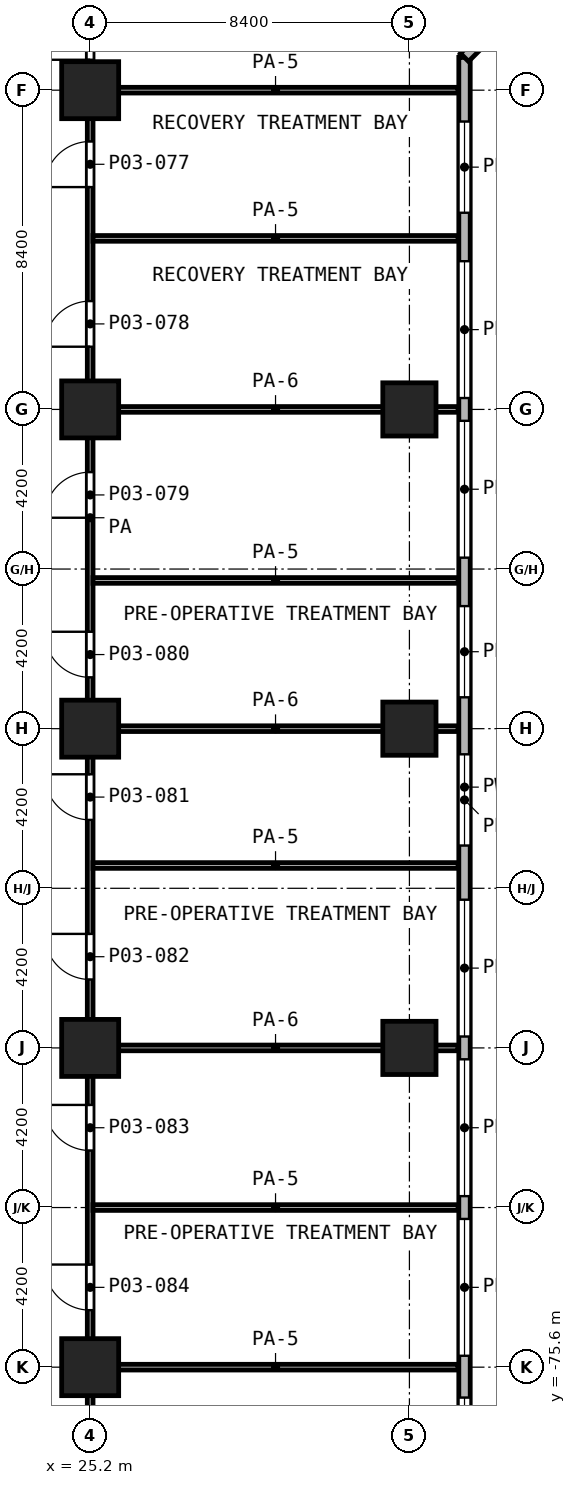
"""IFC4 building model, lengths in metres.
Left out: names, types, materials, properties, quantities, classifications, styles, units other than length and angle.
Written with IfcOpenShell. Run it as: python <this file> out.ifc"""

import sys

from ifc_helpers import new_model, si_unit, direction, frame, frame_2d, origin, origin_2d, place, context, subcontext, project, spatial, rectangle, extrude, element, fill, save


model = new_model("IFC4")
c1 = context("Model", 3, precision=1e-05, world=origin(), true_north=direction((0.0, 1.0)))
c2 = subcontext(c1, "Body", "Model", "MODEL_VIEW")
j1 = project(units=[si_unit("LENGTHUNIT", "METRE"), si_unit("PLANEANGLEUNIT", "RADIAN")], contexts=[c1])
p1 = place(None, origin())
s1 = spatial("IfcSite", under=j1, at=p1, CompositionType="ELEMENT")
p2 = place(p1, origin())
s2 = spatial("IfcBuilding", under=s1, at=p2, CompositionType="ELEMENT")
p3 = place(p2, frame((0.0, 0.0, 12.6)))
s3 = spatial("IfcBuildingStorey", under=s2, at=p3, CompositionType="ELEMENT", Elevation=12.6)
for number, where, z_axis, x_axis in (
    (1, (25.2, -42.0, 0.0), (0.0, 0.0, 1.0), (1.0, 0.0, 0.0)),
    (2, (25.2, -50.4, 0.0), (0.0, 0.0, 1.0), (1.0, 0.0, 0.0)),
):
    element("IfcColumn", number, at=place(p3, frame(where, z_axis=z_axis, x_axis=x_axis)), inside=s3, PredefinedType="COLUMN", context=c2, shape_type="SweptSolid", body=[
        extrude(rectangle(XDim=1.5, YDim=1.5, at=origin_2d()), origin(), (0.0, 0.0, 1.0), 5.6),
    ])
p4 = place(p3, frame((33.6, -50.4, 0.0), z_axis=(0.0, 0.0, 1.0), x_axis=(1.0, 0.0, 0.0)))
e3 = element("IfcColumn", 3, at=p4, inside=s3, PredefinedType="COLUMN", context=c2, shape_type="SweptSolid", body=[
    extrude(rectangle(XDim=1.4, YDim=1.4, at=origin_2d()), origin(), (0.0, 0.0, 1.0), 5.6),
])
p5 = place(p3, frame((25.2, -58.8, 0.0), z_axis=(0.0, 0.0, 1.0), x_axis=(1.0, 0.0, 0.0)))
e4 = element("IfcColumn", 4, at=p5, inside=s3, PredefinedType="COLUMN", context=c2, shape_type="SweptSolid", body=[
    extrude(rectangle(XDim=1.5, YDim=1.5, at=origin_2d()), origin(), (0.0, 0.0, 1.0), 5.6),
])
p6 = place(p3, frame((33.6, -58.8, 0.0), z_axis=(0.0, 0.0, 1.0), x_axis=(1.0, 0.0, 0.0)))
e5 = element("IfcColumn", 5, at=p6, inside=s3, PredefinedType="COLUMN", context=c2, shape_type="SweptSolid", body=[
    extrude(rectangle(XDim=1.4, YDim=1.4, at=origin_2d()), origin(), (0.0, 0.0, 1.0), 5.6),
])
p7 = place(p3, frame((25.2, -67.2, 0.0), z_axis=(0.0, 0.0, 1.0), x_axis=(1.0, 0.0, 0.0)))
e6 = element("IfcColumn", 6, at=p7, inside=s3, PredefinedType="COLUMN", context=c2, shape_type="SweptSolid", body=[
    extrude(rectangle(XDim=1.5, YDim=1.5, at=origin_2d()), origin(), (0.0, 0.0, 1.0), 5.6),
])
p8 = place(p3, frame((33.6, -67.2, 0.0), z_axis=(0.0, 0.0, 1.0), x_axis=(1.0, 0.0, 0.0)))
e7 = element("IfcColumn", 7, at=p8, inside=s3, PredefinedType="COLUMN", context=c2, shape_type="SweptSolid", body=[
    extrude(rectangle(XDim=1.4, YDim=1.4, at=origin_2d()), origin(), (0.0, 0.0, 1.0), 5.6),
])
p9 = place(p3, frame((25.2, -75.6, 0.0), z_axis=(0.0, 0.0, 1.0), x_axis=(1.0, 0.0, 0.0)))
e8 = element("IfcColumn", 8, at=p9, inside=s3, PredefinedType="COLUMN", context=c2, shape_type="SweptSolid", body=[
    extrude(rectangle(XDim=1.5, YDim=1.5, at=origin_2d()), origin(), (0.0, 0.0, 1.0), 5.6),
])
p10 = place(p3, frame((35.05, -79.538, 0.0), z_axis=(0.0, 0.0, 1.0), x_axis=(0.0, 1.0, 0.0)))
e9 = element("IfcWall", 9, at=p10, inside=s3, PredefinedType="SOLIDWALL", context=c2, shape_type="SweptSolid", body=[
    extrude(rectangle(XDim=38.4, YDim=0.3, at=frame_2d((19.2, 0.0))), origin(), (0.0, 0.0, 1.0), 5.25),
])
p11 = place(p10, frame((0.738, 0.0, 0.9)))
e10 = element("IfcOpeningElement", 10, at=p11, cuts=e9, PredefinedType="OPENING", context=c2, shape_type="SweptSolid", body=[
    extrude(rectangle(XDim=2.4, YDim=3.0, at=frame_2d((1.2, 1.5))), frame((0.0, 0.16, 0.0), z_axis=(0.0, -1.0, 0.0), x_axis=(1.0, 0.0, 0.0)), (0.0, 0.0, 1.0), 0.32),
])
p12 = place(p10, frame((4.238, 0.0, 0.9)))
e11 = element("IfcOpeningElement", 11, at=p12, cuts=e9, PredefinedType="OPENING", context=c2, shape_type="SweptSolid", body=[
    extrude(rectangle(XDim=3.6, YDim=3.0, at=frame_2d((1.8, 1.5))), frame((0.0, 0.16, 0.0), z_axis=(0.0, -1.0, 0.0), x_axis=(1.0, 0.0, 0.0)), (0.0, 0.0, 1.0), 0.32),
])
p13 = place(p10, frame((8.438, 0.0, 0.9)))
e12 = element("IfcOpeningElement", 12, at=p13, cuts=e9, PredefinedType="OPENING", context=c2, shape_type="SweptSolid", body=[
    extrude(rectangle(XDim=3.6, YDim=3.0, at=frame_2d((1.8, 1.5))), frame((0.0, 0.16, 0.0), z_axis=(0.0, -1.0, 0.0), x_axis=(1.0, 0.0, 0.0)), (0.0, 0.0, 1.0), 0.32),
])
p14 = place(p10, frame((12.638, 0.0, 0.9)))
e13 = element("IfcOpeningElement", 13, at=p14, cuts=e9, PredefinedType="OPENING", context=c2, shape_type="SweptSolid", body=[
    extrude(rectangle(XDim=3.6, YDim=3.0, at=frame_2d((1.8, 1.5))), frame((0.0, 0.16, 0.0), z_axis=(0.0, -1.0, 0.0), x_axis=(1.0, 0.0, 0.0)), (0.0, 0.0, 1.0), 0.32),
])
p15 = place(p10, frame((17.663, 0.0, 0.9)))
e14 = element("IfcOpeningElement", 14, at=p15, cuts=e9, PredefinedType="OPENING", context=c2, shape_type="SweptSolid", body=[
    extrude(rectangle(XDim=2.4, YDim=3.0, at=frame_2d((1.2, 1.5))), frame((0.0, 0.16, 0.0), z_axis=(0.0, -1.0, 0.0), x_axis=(1.0, 0.0, 0.0)), (0.0, 0.0, 1.0), 0.32),
])
p16 = place(p10, frame((21.563, 0.0, 0.9)))
e15 = element("IfcOpeningElement", 15, at=p16, cuts=e9, PredefinedType="OPENING", context=c2, shape_type="SweptSolid", body=[
    extrude(rectangle(XDim=2.4, YDim=3.0, at=frame_2d((1.2, 1.5))), frame((0.0, 0.16, 0.0), z_axis=(0.0, -1.0, 0.0), x_axis=(1.0, 0.0, 0.0)), (0.0, 0.0, 1.0), 0.32),
])
p17 = place(p10, frame((25.238, 0.0, 0.9)))
e16 = element("IfcOpeningElement", 16, at=p17, cuts=e9, PredefinedType="OPENING", context=c2, shape_type="SweptSolid", body=[
    extrude(rectangle(XDim=3.6, YDim=3.0, at=frame_2d((1.8, 1.5))), frame((0.0, 0.16, 0.0), z_axis=(0.0, -1.0, 0.0), x_axis=(1.0, 0.0, 0.0)), (0.0, 0.0, 1.0), 0.32),
])
p18 = place(p10, frame((29.438, 0.0, 0.9)))
e17 = element("IfcOpeningElement", 17, at=p18, cuts=e9, PredefinedType="OPENING", context=c2, shape_type="SweptSolid", body=[
    extrude(rectangle(XDim=3.6, YDim=3.0, at=frame_2d((1.8, 1.5))), frame((0.0, 0.16, 0.0), z_axis=(0.0, -1.0, 0.0), x_axis=(1.0, 0.0, 0.0)), (0.0, 0.0, 1.0), 0.32),
])
p19 = place(p10, frame((34.313, 0.0, 0.9)))
e18 = element("IfcOpeningElement", 18, at=p19, cuts=e9, PredefinedType="OPENING", context=c2, shape_type="SweptSolid", body=[
    extrude(rectangle(XDim=2.4, YDim=3.0, at=frame_2d((1.2, 1.5))), frame((0.0, 0.16, 0.0), z_axis=(0.0, -1.0, 0.0), x_axis=(1.0, 0.0, 0.0)), (0.0, 0.0, 1.0), 0.32),
])
p20 = place(p3, frame((35.05, -41.138, 0.0), z_axis=(0.0, 0.0, 1.0), x_axis=(0.707106781187, 0.707106781187, 0.0)))
e19 = element("IfcWall", 19, at=p20, inside=s3, PredefinedType="SOLIDWALL", context=c2, shape_type="SweptSolid", body=[
    extrude(rectangle(XDim=8.61, YDim=0.3, at=frame_2d((4.305, 0.0))), origin(), (0.0, 0.0, 1.0), 5.25),
])
p21 = place(p20, frame((2.34, 0.0, 0.9)))
e20 = element("IfcOpeningElement", 20, at=p21, cuts=e19, PredefinedType="OPENING", context=c2, shape_type="SweptSolid", body=[
    extrude(rectangle(XDim=1.2, YDim=3.0, at=frame_2d((0.6, 1.5))), frame((0.0, 0.16, 0.0), z_axis=(0.0, -1.0, 0.0), x_axis=(1.0, 0.0, 0.0)), (0.0, 0.0, 1.0), 0.32),
])
p22 = place(p20, frame((5.593, 0.0, 0.9)))
e21 = element("IfcOpeningElement", 21, at=p22, cuts=e19, PredefinedType="OPENING", context=c2, shape_type="SweptSolid", body=[
    extrude(rectangle(XDim=2.4, YDim=3.0, at=frame_2d((1.2, 1.5))), frame((0.0, 0.16, 0.0), z_axis=(0.0, -1.0, 0.0), x_axis=(1.0, 0.0, 0.0)), (0.0, 0.0, 1.0), 0.32),
])
for number, where, z_axis, x_axis in (
    (22, (25.275, -75.6, 0.0), (0.0, 0.0, 1.0), (1.0, 0.0, 0.0)),
    (23, (25.275, -71.4, 0.0), (0.0, 0.0, 1.0), (1.0, 0.0, 0.0)),
):
    element("IfcWall", number, at=place(p3, frame(where, z_axis=z_axis, x_axis=x_axis)), inside=s3, PredefinedType="PARTITIONING", context=c2, shape_type="SweptSolid", body=[
        extrude(rectangle(XDim=9.605, YDim=0.15, at=frame_2d((4.802, 0.0))), origin(), (0.0, 0.0, 1.0), 3.85),
    ])
p23 = place(p3, frame((25.275, -67.2, 0.0), z_axis=(0.0, 0.0, 1.0), x_axis=(1.0, 0.0, 0.0)))
e24 = element("IfcWall", 24, at=p23, inside=s3, PredefinedType="PARTITIONING", context=c2, shape_type="SweptSolid", body=[
    extrude(rectangle(XDim=9.605, YDim=0.15, at=frame_2d((4.802, 0.0))), origin(), (0.0, 0.0, 1.0), 4.35),
])
p24 = place(p3, frame((25.275, -62.4, 0.0), z_axis=(0.0, 0.0, 1.0), x_axis=(1.0, 0.0, 0.0)))
e25 = element("IfcWall", 25, at=p24, inside=s3, PredefinedType="PARTITIONING", context=c2, shape_type="SweptSolid", body=[
    extrude(rectangle(XDim=9.605, YDim=0.15, at=frame_2d((4.802, 0.0))), origin(), (0.0, 0.0, 1.0), 3.85),
])
p25 = place(p3, frame((25.275, -58.8, 0.0), z_axis=(0.0, 0.0, 1.0), x_axis=(1.0, 0.0, 0.0)))
e26 = element("IfcWall", 26, at=p25, inside=s3, PredefinedType="PARTITIONING", context=c2, shape_type="SweptSolid", body=[
    extrude(rectangle(XDim=9.605, YDim=0.15, at=frame_2d((4.802, 0.0))), origin(), (0.0, 0.0, 1.0), 4.35),
])
p26 = place(p3, frame((25.275, -54.9, 0.0), z_axis=(0.0, 0.0, 1.0), x_axis=(1.0, 0.0, 0.0)))
e27 = element("IfcWall", 27, at=p26, inside=s3, PredefinedType="PARTITIONING", context=c2, shape_type="SweptSolid", body=[
    extrude(rectangle(XDim=9.605, YDim=0.15, at=frame_2d((4.802, 0.0))), origin(), (0.0, 0.0, 1.0), 3.85),
])
p27 = place(p3, frame((25.275, -50.4, 0.0), z_axis=(0.0, 0.0, 1.0), x_axis=(1.0, 0.0, 0.0)))
e28 = element("IfcWall", 28, at=p27, inside=s3, PredefinedType="PARTITIONING", context=c2, shape_type="SweptSolid", body=[
    extrude(rectangle(XDim=9.605, YDim=0.15, at=frame_2d((4.802, 0.0))), origin(), (0.0, 0.0, 1.0), 4.35),
])
for number, where, z_axis, x_axis in (
    (29, (25.275, -45.9, 0.0), (0.0, 0.0, 1.0), (1.0, 0.0, 0.0)),
    (30, (25.275, -42.0, 0.0), (0.0, 0.0, 1.0), (1.0, 0.0, 0.0)),
):
    element("IfcWall", number, at=place(p3, frame(where, z_axis=z_axis, x_axis=x_axis)), inside=s3, PredefinedType="PARTITIONING", context=c2, shape_type="SweptSolid", body=[
        extrude(rectangle(XDim=9.605, YDim=0.15, at=frame_2d((4.802, 0.0))), origin(), (0.0, 0.0, 1.0), 3.85),
    ])
p28 = place(p3, frame((25.2, -81.3, 0.0), z_axis=(0.0, 0.0, 1.0), x_axis=(0.0, 1.0, 0.0)))
e31 = element("IfcWall", 31, at=p28, inside=s3, PredefinedType="PARTITIONING", context=c2, shape_type="SweptSolid", body=[
    extrude(rectangle(XDim=56.1, YDim=0.15, at=frame_2d((28.05, 0.0))), origin(), (0.0, 0.0, 1.0), 5.25),
])
p29 = place(p28, frame((48.5, 0.0, 0.0)))
e32 = element("IfcOpeningElement", 32, at=p29, cuts=e31, PredefinedType="OPENING", context=c2, shape_type="SweptSolid", body=[
    extrude(rectangle(XDim=1.2, YDim=2.1, at=frame_2d((0.6, 1.05))), frame((0.0, 0.085, 0.0), z_axis=(0.0, -1.0, 0.0), x_axis=(1.0, 0.0, 0.0)), (0.0, 0.0, 1.0), 0.17),
])
p30 = place(p28, frame((40.1, 0.0, 0.0)))
e33 = element("IfcOpeningElement", 33, at=p30, cuts=e31, PredefinedType="OPENING", context=c2, shape_type="SweptSolid", body=[
    extrude(rectangle(XDim=1.2, YDim=2.1, at=frame_2d((0.6, 1.05))), frame((0.0, 0.085, 0.0), z_axis=(0.0, -1.0, 0.0), x_axis=(1.0, 0.0, 0.0)), (0.0, 0.0, 1.0), 0.17),
])
p31 = place(p28, frame((36.75, 0.0, 0.0)))
e34 = element("IfcOpeningElement", 34, at=p31, cuts=e31, PredefinedType="OPENING", context=c2, shape_type="SweptSolid", body=[
    extrude(rectangle(XDim=1.2, YDim=2.1, at=frame_2d((0.6, 1.05))), frame((0.0, 0.085, 0.0), z_axis=(0.0, -1.0, 0.0), x_axis=(1.0, 0.0, 0.0)), (0.0, 0.0, 1.0), 0.17),
])
p32 = place(p28, frame((32.55, 0.0, 0.0)))
e35 = element("IfcOpeningElement", 35, at=p32, cuts=e31, PredefinedType="OPENING", context=c2, shape_type="SweptSolid", body=[
    extrude(rectangle(XDim=1.2, YDim=2.1, at=frame_2d((0.6, 1.05))), frame((0.0, 0.085, 0.0), z_axis=(0.0, -1.0, 0.0), x_axis=(1.0, 0.0, 0.0)), (0.0, 0.0, 1.0), 0.17),
])
p33 = place(p28, frame((28.05, 0.0, 0.0)))
e36 = element("IfcOpeningElement", 36, at=p33, cuts=e31, PredefinedType="OPENING", context=c2, shape_type="SweptSolid", body=[
    extrude(rectangle(XDim=1.2, YDim=2.1, at=frame_2d((0.6, 1.05))), frame((0.0, 0.085, 0.0), z_axis=(0.0, -1.0, 0.0), x_axis=(1.0, 0.0, 0.0)), (0.0, 0.0, 1.0), 0.17),
])
p34 = place(p28, frame((23.85, 0.0, 0.0)))
e37 = element("IfcOpeningElement", 37, at=p34, cuts=e31, PredefinedType="OPENING", context=c2, shape_type="SweptSolid", body=[
    extrude(rectangle(XDim=1.2, YDim=2.1, at=frame_2d((0.6, 1.05))), frame((0.0, 0.085, 0.0), z_axis=(0.0, -1.0, 0.0), x_axis=(1.0, 0.0, 0.0)), (0.0, 0.0, 1.0), 0.17),
])
p35 = place(p28, frame((20.1, 0.0, 0.0)))
e38 = element("IfcOpeningElement", 38, at=p35, cuts=e31, PredefinedType="OPENING", context=c2, shape_type="SweptSolid", body=[
    extrude(rectangle(XDim=1.2, YDim=2.1, at=frame_2d((0.6, 1.05))), frame((0.0, 0.085, 0.0), z_axis=(0.0, -1.0, 0.0), x_axis=(1.0, 0.0, 0.0)), (0.0, 0.0, 1.0), 0.17),
])
p36 = place(p28, frame((15.9, 0.0, 0.0)))
e39 = element("IfcOpeningElement", 39, at=p36, cuts=e31, PredefinedType="OPENING", context=c2, shape_type="SweptSolid", body=[
    extrude(rectangle(XDim=1.2, YDim=2.1, at=frame_2d((0.6, 1.05))), frame((0.0, 0.085, 0.0), z_axis=(0.0, -1.0, 0.0), x_axis=(1.0, 0.0, 0.0)), (0.0, 0.0, 1.0), 0.17),
])
p37 = place(p28, frame((11.4, 0.0, 0.0)))
e40 = element("IfcOpeningElement", 40, at=p37, cuts=e31, PredefinedType="OPENING", context=c2, shape_type="SweptSolid", body=[
    extrude(rectangle(XDim=1.2, YDim=2.1, at=frame_2d((0.6, 1.05))), frame((0.0, 0.085, 0.0), z_axis=(0.0, -1.0, 0.0), x_axis=(1.0, 0.0, 0.0)), (0.0, 0.0, 1.0), 0.17),
])
p38 = place(p28, frame((7.2, 0.0, 0.0)))
e41 = element("IfcOpeningElement", 41, at=p38, cuts=e31, PredefinedType="OPENING", context=c2, shape_type="SweptSolid", body=[
    extrude(rectangle(XDim=1.2, YDim=2.1, at=frame_2d((0.6, 1.05))), frame((0.0, 0.085, 0.0), z_axis=(0.0, -1.0, 0.0), x_axis=(1.0, 0.0, 0.0)), (0.0, 0.0, 1.0), 0.17),
])
p39 = place(p28, frame((2.7, 0.0, 0.0)))
e42 = element("IfcOpeningElement", 42, at=p39, cuts=e31, PredefinedType="OPENING", context=c2, shape_type="SweptSolid", body=[
    extrude(rectangle(XDim=1.2, YDim=2.1, at=frame_2d((0.6, 1.05))), frame((0.0, 0.085, 0.0), z_axis=(0.0, -1.0, 0.0), x_axis=(1.0, 0.0, 0.0)), (0.0, 0.0, 1.0), 0.17),
])
p40 = place(p11, origin())
e43 = element("IfcWindow", 43, at=p40, inside=s3, PartitioningType="SINGLE_PANEL", PredefinedType="WINDOW", context=c2, shape_type="SweptSolid", body=[
    extrude(rectangle(XDim=2.4, YDim=3.0, at=frame_2d((1.2, 1.5))), frame((0.0, 0.03, 0.0), z_axis=(0.0, -1.0, 0.0), x_axis=(1.0, 0.0, 0.0)), (0.0, 0.0, 1.0), 0.06),
])
fill(e10, e43)
p41 = place(p12, origin())
e44 = element("IfcWindow", 44, at=p41, inside=s3, PartitioningType="SINGLE_PANEL", PredefinedType="WINDOW", context=c2, shape_type="SweptSolid", body=[
    extrude(rectangle(XDim=3.6, YDim=3.0, at=frame_2d((1.8, 1.5))), frame((0.0, 0.03, 0.0), z_axis=(0.0, -1.0, 0.0), x_axis=(1.0, 0.0, 0.0)), (0.0, 0.0, 1.0), 0.06),
])
fill(e11, e44)
p42 = place(p13, origin())
e45 = element("IfcWindow", 45, at=p42, inside=s3, PartitioningType="SINGLE_PANEL", PredefinedType="WINDOW", context=c2, shape_type="SweptSolid", body=[
    extrude(rectangle(XDim=3.6, YDim=3.0, at=frame_2d((1.8, 1.5))), frame((0.0, 0.03, 0.0), z_axis=(0.0, -1.0, 0.0), x_axis=(1.0, 0.0, 0.0)), (0.0, 0.0, 1.0), 0.06),
])
fill(e12, e45)
p43 = place(p14, origin())
e46 = element("IfcWindow", 46, at=p43, inside=s3, PartitioningType="SINGLE_PANEL", PredefinedType="WINDOW", context=c2, shape_type="SweptSolid", body=[
    extrude(rectangle(XDim=3.6, YDim=3.0, at=frame_2d((1.8, 1.5))), frame((0.0, 0.03, 0.0), z_axis=(0.0, -1.0, 0.0), x_axis=(1.0, 0.0, 0.0)), (0.0, 0.0, 1.0), 0.06),
])
fill(e13, e46)
p44 = place(p15, origin())
e47 = element("IfcWindow", 47, at=p44, inside=s3, PartitioningType="SINGLE_PANEL", PredefinedType="WINDOW", context=c2, shape_type="SweptSolid", body=[
    extrude(rectangle(XDim=2.4, YDim=3.0, at=frame_2d((1.2, 1.5))), frame((0.0, 0.03, 0.0), z_axis=(0.0, -1.0, 0.0), x_axis=(1.0, 0.0, 0.0)), (0.0, 0.0, 1.0), 0.06),
])
fill(e14, e47)
p45 = place(p16, origin())
e48 = element("IfcWindow", 48, at=p45, inside=s3, PartitioningType="SINGLE_PANEL", PredefinedType="WINDOW", context=c2, shape_type="SweptSolid", body=[
    extrude(rectangle(XDim=2.4, YDim=3.0, at=frame_2d((1.2, 1.5))), frame((0.0, 0.03, 0.0), z_axis=(0.0, -1.0, 0.0), x_axis=(1.0, 0.0, 0.0)), (0.0, 0.0, 1.0), 0.06),
])
fill(e15, e48)
p46 = place(p17, origin())
e49 = element("IfcWindow", 49, at=p46, inside=s3, PartitioningType="SINGLE_PANEL", PredefinedType="WINDOW", context=c2, shape_type="SweptSolid", body=[
    extrude(rectangle(XDim=3.6, YDim=3.0, at=frame_2d((1.8, 1.5))), frame((0.0, 0.03, 0.0), z_axis=(0.0, -1.0, 0.0), x_axis=(1.0, 0.0, 0.0)), (0.0, 0.0, 1.0), 0.06),
])
fill(e16, e49)
p47 = place(p18, origin())
e50 = element("IfcWindow", 50, at=p47, inside=s3, PartitioningType="SINGLE_PANEL", PredefinedType="WINDOW", context=c2, shape_type="SweptSolid", body=[
    extrude(rectangle(XDim=3.6, YDim=3.0, at=frame_2d((1.8, 1.5))), frame((0.0, 0.03, 0.0), z_axis=(0.0, -1.0, 0.0), x_axis=(1.0, 0.0, 0.0)), (0.0, 0.0, 1.0), 0.06),
])
fill(e17, e50)
p48 = place(p19, origin())
e51 = element("IfcWindow", 51, at=p48, inside=s3, PartitioningType="SINGLE_PANEL", PredefinedType="WINDOW", context=c2, shape_type="SweptSolid", body=[
    extrude(rectangle(XDim=2.4, YDim=3.0, at=frame_2d((1.2, 1.5))), frame((0.0, 0.03, 0.0), z_axis=(0.0, -1.0, 0.0), x_axis=(1.0, 0.0, 0.0)), (0.0, 0.0, 1.0), 0.06),
])
fill(e18, e51)
p49 = place(p30, origin())
e52 = element("IfcDoor", 52, at=p49, inside=s3, OperationType="SINGLE_SWING_LEFT", PredefinedType="DOOR", context=c2, shape_type="SweptSolid", body=[
    extrude(rectangle(XDim=1.2, YDim=2.1, at=frame_2d((0.6, 1.05))), frame((0.0, 0.025, 0.0), z_axis=(0.0, -1.0, 0.0), x_axis=(1.0, 0.0, 0.0)), (0.0, 0.0, 1.0), 0.05),
])
fill(e33, e52)
p50 = place(p31, origin())
e53 = element("IfcDoor", 53, at=p50, inside=s3, OperationType="SINGLE_SWING_LEFT", PredefinedType="DOOR", context=c2, shape_type="SweptSolid", body=[
    extrude(rectangle(XDim=1.2, YDim=2.1, at=frame_2d((0.6, 1.05))), frame((0.0, 0.025, 0.0), z_axis=(0.0, -1.0, 0.0), x_axis=(1.0, 0.0, 0.0)), (0.0, 0.0, 1.0), 0.05),
])
fill(e34, e53)
p51 = place(p32, origin())
e54 = element("IfcDoor", 54, at=p51, inside=s3, OperationType="SINGLE_SWING_LEFT", PredefinedType="DOOR", context=c2, shape_type="SweptSolid", body=[
    extrude(rectangle(XDim=1.2, YDim=2.1, at=frame_2d((0.6, 1.05))), frame((0.0, 0.025, 0.0), z_axis=(0.0, -1.0, 0.0), x_axis=(1.0, 0.0, 0.0)), (0.0, 0.0, 1.0), 0.05),
])
fill(e35, e54)
p52 = place(p33, origin())
e55 = element("IfcDoor", 55, at=p52, inside=s3, OperationType="SINGLE_SWING_LEFT", PredefinedType="DOOR", context=c2, shape_type="SweptSolid", body=[
    extrude(rectangle(XDim=1.2, YDim=2.1, at=frame_2d((0.6, 1.05))), frame((0.0, 0.025, 0.0), z_axis=(0.0, -1.0, 0.0), x_axis=(1.0, 0.0, 0.0)), (0.0, 0.0, 1.0), 0.05),
])
fill(e36, e55)
p53 = place(p34, origin())
e56 = element("IfcDoor", 56, at=p53, inside=s3, OperationType="SINGLE_SWING_RIGHT", PredefinedType="DOOR", context=c2, shape_type="SweptSolid", body=[
    extrude(rectangle(XDim=1.2, YDim=2.1, at=frame_2d((0.6, 1.05))), frame((0.0, 0.025, 0.0), z_axis=(0.0, -1.0, 0.0), x_axis=(1.0, 0.0, 0.0)), (0.0, 0.0, 1.0), 0.05),
])
fill(e37, e56)
p54 = place(p35, origin())
e57 = element("IfcDoor", 57, at=p54, inside=s3, OperationType="SINGLE_SWING_RIGHT", PredefinedType="DOOR", context=c2, shape_type="SweptSolid", body=[
    extrude(rectangle(XDim=1.2, YDim=2.1, at=frame_2d((0.6, 1.05))), frame((0.0, 0.025, 0.0), z_axis=(0.0, -1.0, 0.0), x_axis=(1.0, 0.0, 0.0)), (0.0, 0.0, 1.0), 0.05),
])
fill(e38, e57)
p55 = place(p36, origin())
e58 = element("IfcDoor", 58, at=p55, inside=s3, OperationType="SINGLE_SWING_RIGHT", PredefinedType="DOOR", context=c2, shape_type="SweptSolid", body=[
    extrude(rectangle(XDim=1.2, YDim=2.1, at=frame_2d((0.6, 1.05))), frame((0.0, 0.025, 0.0), z_axis=(0.0, -1.0, 0.0), x_axis=(1.0, 0.0, 0.0)), (0.0, 0.0, 1.0), 0.05),
])
fill(e39, e58)
p56 = place(p37, origin())
e59 = element("IfcDoor", 59, at=p56, inside=s3, OperationType="SINGLE_SWING_RIGHT", PredefinedType="DOOR", context=c2, shape_type="SweptSolid", body=[
    extrude(rectangle(XDim=1.2, YDim=2.1, at=frame_2d((0.6, 1.05))), frame((0.0, 0.025, 0.0), z_axis=(0.0, -1.0, 0.0), x_axis=(1.0, 0.0, 0.0)), (0.0, 0.0, 1.0), 0.05),
])
fill(e40, e59)
p57 = place(p38, origin())
e60 = element("IfcDoor", 60, at=p57, inside=s3, OperationType="SINGLE_SWING_RIGHT", PredefinedType="DOOR", context=c2, shape_type="SweptSolid", body=[
    extrude(rectangle(XDim=1.2, YDim=2.1, at=frame_2d((0.6, 1.05))), frame((0.0, 0.025, 0.0), z_axis=(0.0, -1.0, 0.0), x_axis=(1.0, 0.0, 0.0)), (0.0, 0.0, 1.0), 0.05),
])
fill(e41, e60)
save(model, sys.argv[1])
